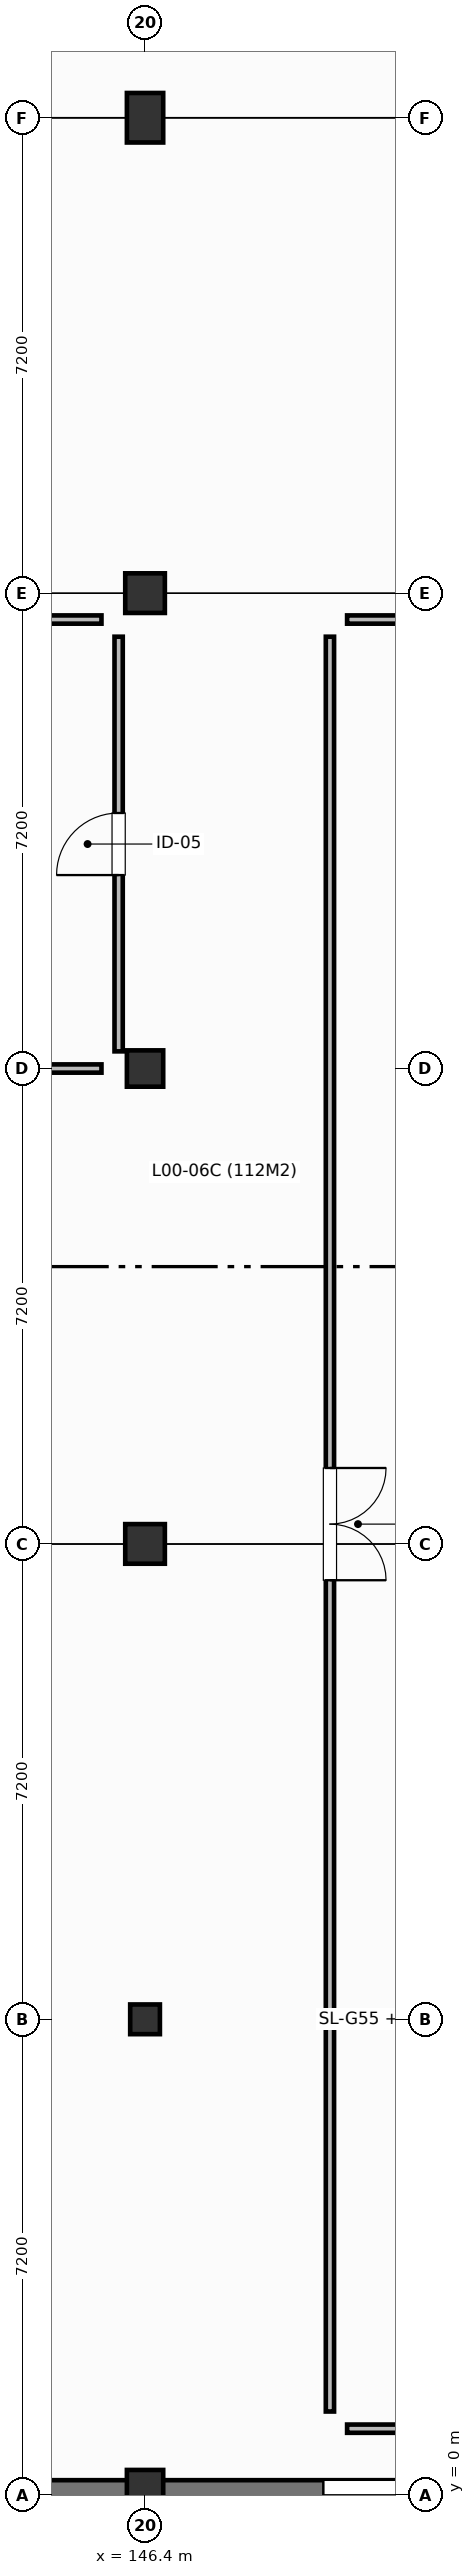
"""IFC4 building model, lengths in metres.
Left out: names, types, materials, properties, quantities, classifications, styles, units other than length and angle.
Written with IfcOpenShell. Run it as: python <this file> out.ifc"""

import sys

from ifc_helpers import new_model, si_unit, direction, frame, frame_2d, origin, origin_2d, place, context, subcontext, project, spatial, rectangle, extrude, element, fill, save


model = new_model("IFC4")
c1 = context("Model", 3, precision=1e-05, world=origin(), true_north=direction((0.0, 1.0)))
c2 = subcontext(c1, "Body", "Model", "MODEL_VIEW")
j1 = project(units=[si_unit("LENGTHUNIT", "METRE"), si_unit("PLANEANGLEUNIT", "RADIAN")], contexts=[c1])
p1 = place(None, origin())
s1 = spatial("IfcSite", under=j1, at=p1, CompositionType="ELEMENT")
p2 = place(p1, origin())
s2 = spatial("IfcBuilding", under=s1, at=p2, CompositionType="ELEMENT")
p3 = place(p2, origin())
s3 = spatial("IfcBuildingStorey", under=s2, at=p3, CompositionType="ELEMENT", Elevation=0.0)
p4 = place(p3, frame((146.4, 0.0, 0.0), z_axis=(0.0, 0.0, 1.0), x_axis=(1.0, 0.0, 0.0)))
e1 = element("IfcColumn", 1, at=p4, inside=s3, PredefinedType="COLUMN", context=c2, shape_type="SweptSolid", body=[
    extrude(rectangle(XDim=0.55, YDim=0.75, at=origin_2d()), origin(), (0.0, 0.0, 1.0), 4.8),
])
p5 = place(p3, frame((146.4, 7.2, 0.0), z_axis=(0.0, 0.0, 1.0), x_axis=(1.0, 0.0, 0.0)))
e2 = element("IfcColumn", 2, at=p5, inside=s3, PredefinedType="COLUMN", context=c2, shape_type="SweptSolid", body=[
    extrude(rectangle(XDim=0.45, YDim=0.45, at=origin_2d()), origin(), (0.0, 0.0, 1.0), 4.8),
])
p6 = place(p3, frame((146.4, 14.4, 0.0), z_axis=(0.0, 0.0, 1.0), x_axis=(1.0, 0.0, 0.0)))
e3 = element("IfcColumn", 3, at=p6, inside=s3, PredefinedType="COLUMN", context=c2, shape_type="SweptSolid", body=[
    extrude(rectangle(XDim=0.6, YDim=0.6, at=origin_2d()), origin(), (0.0, 0.0, 1.0), 4.8),
])
p7 = place(p3, frame((146.4, 21.6, 0.0), z_axis=(0.0, 0.0, 1.0), x_axis=(1.0, 0.0, 0.0)))
e4 = element("IfcColumn", 4, at=p7, inside=s3, PredefinedType="COLUMN", context=c2, shape_type="SweptSolid", body=[
    extrude(rectangle(XDim=0.55, YDim=0.55, at=origin_2d()), origin(), (0.0, 0.0, 1.0), 4.8),
])
p8 = place(p3, frame((146.4, 28.8, 0.0), z_axis=(0.0, 0.0, 1.0), x_axis=(1.0, 0.0, 0.0)))
e5 = element("IfcColumn", 5, at=p8, inside=s3, PredefinedType="COLUMN", context=c2, shape_type="SweptSolid", body=[
    extrude(rectangle(XDim=0.6, YDim=0.6, at=origin_2d()), origin(), (0.0, 0.0, 1.0), 4.8),
])
p9 = place(p3, frame((146.4, 36.0, 0.0), z_axis=(0.0, 0.0, 1.0), x_axis=(1.0, 0.0, 0.0)))
e6 = element("IfcColumn", 6, at=p9, inside=s3, PredefinedType="COLUMN", context=c2, shape_type="SweptSolid", body=[
    extrude(rectangle(XDim=0.55, YDim=0.75, at=origin_2d()), origin(), (0.0, 0.0, 1.0), 4.8),
])
p10 = place(p3, frame((153.6, 0.0, 0.0), z_axis=(0.0, 0.0, 1.0), x_axis=(-1.0, 0.0, 0.0)))
e7 = element("IfcWall", 7, at=p10, inside=s3, PredefinedType="STANDARD", context=c2, shape_type="SweptSolid", body=[
    extrude(rectangle(XDim=7.2, YDim=0.44, at=frame_2d((3.6, 0.0))), origin(), (0.0, 0.0, 1.0), 4.44),
])
p11 = place(p10, frame((2.7, 0.0, 0.8)))
e8 = element("IfcOpeningElement", 8, at=p11, cuts=e7, PredefinedType="OPENING", context=c2, shape_type="SweptSolid", body=[
    extrude(rectangle(XDim=1.8, YDim=1.65, at=frame_2d((0.9, 0.825))), frame((0.0, 0.23, 0.0), z_axis=(0.0, -1.0, 0.0), x_axis=(1.0, 0.0, 0.0)), (0.0, 0.0, 1.0), 0.46),
])
p12 = place(p3, frame((146.4, 0.0, 0.0), z_axis=(0.0, 0.0, 1.0), x_axis=(-1.0, 0.0, 0.0)))
e9 = element("IfcWall", 9, at=p12, inside=s3, PredefinedType="STANDARD", context=c2, shape_type="SweptSolid", body=[
    extrude(rectangle(XDim=7.2, YDim=0.44, at=frame_2d((3.6, 0.0))), origin(), (0.0, 0.0, 1.0), 4.44),
])
p13 = place(p12, frame((2.9, 0.0, 0.8)))
e10 = element("IfcOpeningElement", 10, at=p13, cuts=e9, PredefinedType="OPENING", context=c2, shape_type="SweptSolid", body=[
    extrude(rectangle(XDim=1.4, YDim=2.05, at=frame_2d((0.7, 1.025))), frame((0.0, 0.23, 0.0), z_axis=(0.0, -1.0, 0.0), x_axis=(1.0, 0.0, 0.0)), (0.0, 0.0, 1.0), 0.46),
])
p14 = place(p3, frame((149.46, 1.0, 0.0), z_axis=(0.0, 0.0, 1.0), x_axis=(1.0, 0.0, 0.0)))
e11 = element("IfcWall", 11, at=p14, inside=s3, PredefinedType="PARTITIONING", context=c2, shape_type="SweptSolid", body=[
    extrude(rectangle(XDim=17.28, YDim=0.125, at=frame_2d((8.64, 0.0))), origin(), (0.0, 0.0, 1.0), 4.44),
])
p15 = place(p3, frame((166.74, 28.4, 0.0), z_axis=(0.0, 0.0, 1.0), x_axis=(-1.0, 0.0, 0.0)))
e12 = element("IfcWall", 12, at=p15, inside=s3, PredefinedType="PARTITIONING", context=c2, shape_type="SweptSolid", body=[
    extrude(rectangle(XDim=17.28, YDim=0.125, at=frame_2d((8.64, 0.0))), origin(), (0.0, 0.0, 1.0), 3.515),
])
p16 = place(p3, frame((149.2, 28.14, 0.0), z_axis=(0.0, 0.0, 1.0), x_axis=(0.0, -1.0, 0.0)))
e13 = element("IfcWall", 13, at=p16, inside=s3, PredefinedType="PARTITIONING", context=c2, shape_type="SweptSolid", body=[
    extrude(rectangle(XDim=26.88, YDim=0.125, at=frame_2d((13.44, 0.0))), origin(), (0.0, 0.0, 1.0), 4.44),
])
p17 = place(p16, frame((12.59, 0.0, 0.0)))
e14 = element("IfcOpeningElement", 14, at=p17, cuts=e13, PredefinedType="OPENING", context=c2, shape_type="SweptSolid", body=[
    extrude(rectangle(XDim=1.7, YDim=2.2, at=frame_2d((0.85, 1.1))), frame((0.0, 0.073, 0.0), z_axis=(0.0, -1.0, 0.0), x_axis=(1.0, 0.0, 0.0)), (0.0, 0.0, 1.0), 0.145),
])
p18 = place(p3, frame((136.66, 21.6, 0.0), z_axis=(0.0, 0.0, 1.0), x_axis=(1.0, 0.0, 0.0)))
e15 = element("IfcWall", 15, at=p18, inside=s3, PredefinedType="PARTITIONING", context=c2, shape_type="SweptSolid", body=[
    extrude(rectangle(XDim=9.08, YDim=0.125, at=frame_2d((4.54, 0.0))), origin(), (0.0, 0.0, 1.0), 3.665),
])
p19 = place(p3, frame((146.0, 21.86, 0.0), z_axis=(0.0, 0.0, 1.0), x_axis=(0.0, 1.0, 0.0)))
e16 = element("IfcWall", 16, at=p19, inside=s3, PredefinedType="PARTITIONING", context=c2, shape_type="SweptSolid", body=[
    extrude(rectangle(XDim=6.28, YDim=0.125, at=frame_2d((3.14, 0.0))), origin(), (0.0, 0.0, 1.0), 3.615),
])
p20 = place(p19, frame((2.67, 0.0, 0.0)))
e17 = element("IfcOpeningElement", 17, at=p20, cuts=e16, PredefinedType="OPENING", context=c2, shape_type="SweptSolid", body=[
    extrude(rectangle(XDim=0.94, YDim=2.1, at=frame_2d((0.47, 1.05))), frame((0.0, 0.073, 0.0), z_axis=(0.0, -1.0, 0.0), x_axis=(1.0, 0.0, 0.0)), (0.0, 0.0, 1.0), 0.145),
])
p21 = place(p3, frame((145.74, 28.4, 0.0), z_axis=(0.0, 0.0, 1.0), x_axis=(-1.0, 0.0, 0.0)))
e18 = element("IfcWall", 18, at=p21, inside=s3, PredefinedType="PARTITIONING", context=c2, shape_type="SweptSolid", body=[
    extrude(rectangle(XDim=9.08, YDim=0.125, at=frame_2d((4.54, 0.0))), origin(), (0.0, 0.0, 1.0), 3.665),
])
p22 = place(p11, origin())
e19 = element("IfcWindow", 19, at=p22, inside=s3, PartitioningType="SINGLE_PANEL", PredefinedType="WINDOW", context=c2, shape_type="SweptSolid", body=[
    extrude(rectangle(XDim=1.8, YDim=1.65, at=frame_2d((0.9, 0.825))), frame((0.0, 0.03, 0.0), z_axis=(0.0, -1.0, 0.0), x_axis=(1.0, 0.0, 0.0)), (0.0, 0.0, 1.0), 0.06),
])
fill(e8, e19)
p23 = place(p17, origin())
e20 = element("IfcDoor", 20, at=p23, inside=s3, OperationType="DOUBLE_DOOR_SINGLE_SWING", PredefinedType="DOOR", context=c2, shape_type="SweptSolid", body=[
    extrude(rectangle(XDim=1.7, YDim=2.2, at=frame_2d((0.85, 1.1))), frame((0.0, 0.025, 0.0), z_axis=(0.0, -1.0, 0.0), x_axis=(1.0, 0.0, 0.0)), (0.0, 0.0, 1.0), 0.05),
])
fill(e14, e20)
p24 = place(p20, origin())
e21 = element("IfcDoor", 21, at=p24, inside=s3, OperationType="SINGLE_SWING_LEFT", PredefinedType="DOOR", context=c2, shape_type="SweptSolid", body=[
    extrude(rectangle(XDim=0.94, YDim=2.1, at=frame_2d((0.47, 1.05))), frame((0.0, 0.025, 0.0), z_axis=(0.0, -1.0, 0.0), x_axis=(1.0, 0.0, 0.0)), (0.0, 0.0, 1.0), 0.05),
])
fill(e17, e21)
save(model, sys.argv[1])
